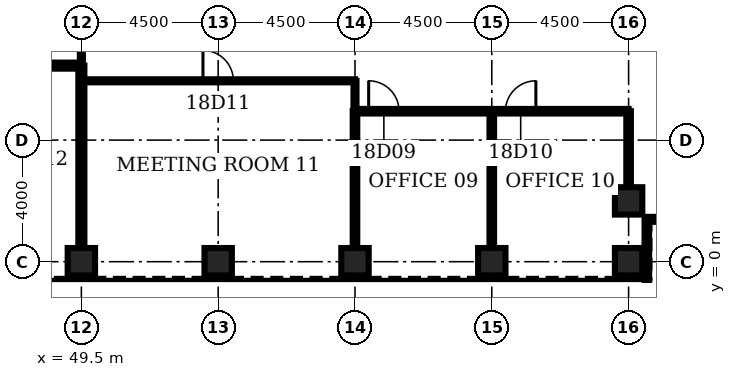
"""IFC4 building model, lengths in metres.
Left out: names, types, materials, properties, quantities, classifications, styles, units other than length and angle.
Written with IfcOpenShell. Run it as: python <this file> out.ifc"""

import sys

from ifc_helpers import new_model, si_unit, direction, frame, frame_2d, origin, origin_2d, place, context, subcontext, project, spatial, rectangle, hollow_rectangle, extrude, element, fill, save


model = new_model("IFC4")
c1 = context("Model", 3, precision=1e-05, world=origin(), true_north=direction((0.0, 1.0)))
c2 = subcontext(c1, "Body", "Model", "MODEL_VIEW")
j1 = project(units=[si_unit("LENGTHUNIT", "METRE"), si_unit("PLANEANGLEUNIT", "RADIAN")], contexts=[c1])
p1 = place(None, origin())
s1 = spatial("IfcSite", under=j1, at=p1, CompositionType="ELEMENT")
p2 = place(p1, origin())
s2 = spatial("IfcBuilding", under=s1, at=p2, CompositionType="ELEMENT")
p3 = place(p2, frame((0.0, 0.0, 86.0)))
s3 = spatial("IfcBuildingStorey", under=s2, at=p3, CompositionType="ELEMENT", Elevation=86.0)
for number, where, z_axis, x_axis in (
    (1, (49.5, 0.0, 0.0), (0.0, 0.0, 1.0), (0.0, 1.0, 0.0)),
    (2, (54.0, 0.0, 0.0), (0.0, 0.0, 1.0), (0.0, 1.0, 0.0)),
    (3, (58.5, 0.0, 0.0), (0.0, 0.0, 1.0), (0.0, 1.0, 0.0)),
    (4, (63.0, 0.0, 0.0), (0.0, 0.0, 1.0), (0.0, 1.0, 0.0)),
    (5, (67.5, 0.0, 0.0), (0.0, 0.0, 1.0), (0.0, 1.0, 0.0)),
    (6, (67.5, 2.0, 0.0), (0.0, 0.0, 1.0), (0.0, 1.0, 0.0)),
):
    element("IfcColumn", number, at=place(p3, frame(where, z_axis=z_axis, x_axis=x_axis)), inside=s3, PredefinedType="COLUMN", context=c2, shape_type="SweptSolid", body=[
        extrude(hollow_rectangle(XDim=0.9, YDim=0.9, WallThickness=0.11, at=origin_2d()), origin(), (0.0, 0.0, 1.0), 4.5),
    ])
p4 = place(p3, frame((58.5, 4.95, 0.0), z_axis=(0.0, 0.0, 1.0), x_axis=(1.0, 0.0, 0.0)))
e7 = element("IfcWall", 7, at=p4, inside=s3, PredefinedType="PARTITIONING", context=c2, shape_type="SweptSolid", body=[
    extrude(rectangle(XDim=9.0, YDim=0.15, at=frame_2d((4.5, 0.0))), origin(), (0.0, 0.0, 1.0), 3.0),
])
p5 = place(p4, frame((0.45, 0.0, 0.0)))
e8 = element("IfcOpeningElement", 8, at=p5, cuts=e7, PredefinedType="OPENING", context=c2, shape_type="SweptSolid", body=[
    extrude(rectangle(XDim=1.0, YDim=2.1, at=frame_2d((0.5, 1.05))), frame((0.0, 0.085, 0.0), z_axis=(0.0, -1.0, 0.0), x_axis=(1.0, 0.0, 0.0)), (0.0, 0.0, 1.0), 0.17),
])
p6 = place(p4, frame((4.95, 0.0, 0.0)))
e9 = element("IfcOpeningElement", 9, at=p6, cuts=e7, PredefinedType="OPENING", context=c2, shape_type="SweptSolid", body=[
    extrude(rectangle(XDim=1.0, YDim=2.1, at=frame_2d((0.5, 1.05))), frame((0.0, 0.085, 0.0), z_axis=(0.0, -1.0, 0.0), x_axis=(1.0, 0.0, 0.0)), (0.0, 0.0, 1.0), 0.17),
])
p7 = place(p3, frame((49.5, 5.95, 0.0), z_axis=(0.0, 0.0, 1.0), x_axis=(1.0, 0.0, 0.0)))
e10 = element("IfcWall", 10, at=p7, inside=s3, PredefinedType="PARTITIONING", context=c2, shape_type="SweptSolid", body=[
    extrude(rectangle(XDim=9.0, YDim=0.1, at=frame_2d((4.5, 0.0))), origin(), (0.0, 0.0, 1.0), 3.0),
])
p8 = place(p7, frame((4.0, 0.0, 0.0)))
e11 = element("IfcOpeningElement", 11, at=p8, cuts=e10, PredefinedType="OPENING", context=c2, shape_type="SweptSolid", body=[
    extrude(rectangle(XDim=1.0, YDim=2.1, at=frame_2d((0.5, 1.05))), frame((0.0, 0.06, 0.0), z_axis=(0.0, -1.0, 0.0), x_axis=(1.0, 0.0, 0.0)), (0.0, 0.0, 1.0), 0.12),
])
p9 = place(p3, frame((40.5, 6.45, 0.0), z_axis=(0.0, 0.0, 1.0), x_axis=(1.0, 0.0, 0.0)))
e12 = element("IfcWall", 12, at=p9, inside=s3, PredefinedType="PARTITIONING", context=c2, shape_type="SweptSolid", body=[
    extrude(rectangle(XDim=9.0, YDim=0.2, at=frame_2d((4.5, 0.0))), origin(), (0.0, 0.0, 1.0), 3.0),
])
p10 = place(p9, frame((3.7, 0.0, 0.0)))
e13 = element("IfcOpeningElement", 13, at=p10, cuts=e12, PredefinedType="OPENING", context=c2, shape_type="SweptSolid", body=[
    extrude(rectangle(XDim=1.6, YDim=2.1, at=frame_2d((0.8, 1.05))), frame((0.0, 0.11, 0.0), z_axis=(0.0, -1.0, 0.0), x_axis=(1.0, 0.0, 0.0)), (0.0, 0.0, 1.0), 0.22),
])
p11 = place(p3, frame((49.5, 0.45, 0.0), z_axis=(0.0, 0.0, 1.0), x_axis=(0.0, 1.0, 0.0)))
e14 = element("IfcWall", 14, at=p11, inside=s3, PredefinedType="PARTITIONING", context=c2, shape_type="SweptSolid", body=[
    extrude(rectangle(XDim=6.0, YDim=0.2, at=frame_2d((3.0, 0.0))), origin(), (0.0, 0.0, 1.0), 3.0),
])
p12 = place(p3, frame((49.5, 6.45, 0.0), z_axis=(0.0, 0.0, 1.0), x_axis=(0.0, 1.0, 0.0)))
e15 = element("IfcWall", 15, at=p12, inside=s3, PredefinedType="PARTITIONING", context=c2, shape_type="SweptSolid", body=[
    extrude(rectangle(XDim=9.1, YDim=0.1, at=frame_2d((4.55, 0.0))), origin(), (0.0, 0.0, 1.0), 3.0),
])
p13 = place(p12, frame((3.75, 0.0, 0.0)))
e16 = element("IfcOpeningElement", 16, at=p13, cuts=e15, PredefinedType="OPENING", context=c2, shape_type="SweptSolid", body=[
    extrude(rectangle(XDim=1.6, YDim=2.1, at=frame_2d((0.8, 1.05))), frame((0.0, 0.06, 0.0), z_axis=(0.0, -1.0, 0.0), x_axis=(1.0, 0.0, 0.0)), (0.0, 0.0, 1.0), 0.12),
])
p14 = place(p3, frame((58.5, 0.45, 0.0), z_axis=(0.0, 0.0, 1.0), x_axis=(0.0, 1.0, 0.0)))
e17 = element("IfcWall", 17, at=p14, inside=s3, PredefinedType="PARTITIONING", context=c2, shape_type="SweptSolid", body=[
    extrude(rectangle(XDim=4.5, YDim=0.15, at=frame_2d((2.25, 0.0))), origin(), (0.0, 0.0, 1.0), 3.0),
])
p15 = place(p3, frame((58.5, 4.95, 0.0), z_axis=(0.0, 0.0, 1.0), x_axis=(0.0, 1.0, 0.0)))
e18 = element("IfcWall", 18, at=p15, inside=s3, PredefinedType="PARTITIONING", context=c2, shape_type="SweptSolid", body=[
    extrude(rectangle(XDim=1.0, YDim=0.1, at=frame_2d((0.5, 0.0))), origin(), (0.0, 0.0, 1.0), 3.0),
])
p16 = place(p3, frame((63.0, 0.45, 0.0), z_axis=(0.0, 0.0, 1.0), x_axis=(0.0, 1.0, 0.0)))
e19 = element("IfcWall", 19, at=p16, inside=s3, PredefinedType="PARTITIONING", context=c2, shape_type="SweptSolid", body=[
    extrude(rectangle(XDim=4.5, YDim=0.15, at=frame_2d((2.25, 0.0))), origin(), (0.0, 0.0, 1.0), 3.0),
])
p17 = place(p3, frame((67.5, 2.45, 0.0), z_axis=(0.0, 0.0, 1.0), x_axis=(0.0, 1.0, 0.0)))
e20 = element("IfcWall", 20, at=p17, inside=s3, PredefinedType="PARTITIONING", context=c2, shape_type="SweptSolid", body=[
    extrude(rectangle(XDim=2.5, YDim=0.15, at=frame_2d((1.25, 0.0))), origin(), (0.0, 0.0, 1.0), 3.0),
])
p18 = place(p3, frame((68.1, -0.6, 0.0), z_axis=(0.0, 0.0, 1.0), x_axis=(0.0, 1.0, 0.0)))
e21 = element("IfcWall", 21, at=p18, inside=s3, PredefinedType="ELEMENTEDWALL", context=c2, shape_type="SweptSolid", body=[
    extrude(rectangle(XDim=2.0, YDim=0.15, at=frame_2d((1.0, 0.0))), origin(), (0.0, 0.0, 1.0), 4.32),
])
p19 = place(p3, frame((68.1, 1.4, 0.0), z_axis=(0.0, 0.0, 1.0), x_axis=(1.0, 0.0, 0.0)))
e22 = element("IfcWall", 22, at=p19, inside=s3, PredefinedType="ELEMENTEDWALL", context=c2, shape_type="SweptSolid", body=[
    extrude(rectangle(XDim=2.25, YDim=0.15, at=frame_2d((1.125, 0.0))), origin(), (0.0, 0.0, 1.0), 4.32),
])
p20 = place(p5, origin())
e23 = element("IfcDoor", 23, at=p20, inside=s3, OperationType="SINGLE_SWING_LEFT", PredefinedType="DOOR", context=c2, shape_type="SweptSolid", body=[
    extrude(rectangle(XDim=1.0, YDim=2.1, at=frame_2d((0.5, 1.05))), frame((0.0, 0.025, 0.0), z_axis=(0.0, -1.0, 0.0), x_axis=(1.0, 0.0, 0.0)), (0.0, 0.0, 1.0), 0.05),
])
fill(e8, e23)
p21 = place(p6, origin())
e24 = element("IfcDoor", 24, at=p21, inside=s3, OperationType="SINGLE_SWING_RIGHT", PredefinedType="DOOR", context=c2, shape_type="SweptSolid", body=[
    extrude(rectangle(XDim=1.0, YDim=2.1, at=frame_2d((0.5, 1.05))), frame((0.0, 0.025, 0.0), z_axis=(0.0, -1.0, 0.0), x_axis=(1.0, 0.0, 0.0)), (0.0, 0.0, 1.0), 0.05),
])
fill(e9, e24)
p22 = place(p8, origin())
e25 = element("IfcDoor", 25, at=p22, inside=s3, OperationType="SINGLE_SWING_LEFT", PredefinedType="DOOR", context=c2, shape_type="SweptSolid", body=[
    extrude(rectangle(XDim=1.0, YDim=2.1, at=frame_2d((0.5, 1.05))), frame((0.0, 0.025, 0.0), z_axis=(0.0, -1.0, 0.0), x_axis=(1.0, 0.0, 0.0)), (0.0, 0.0, 1.0), 0.05),
])
fill(e11, e25)
save(model, sys.argv[1])
